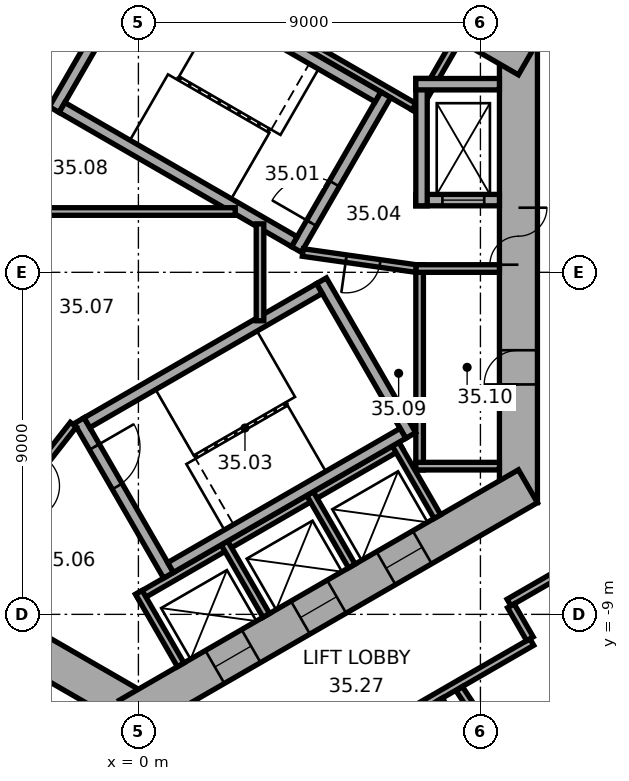
"""IFC4 building model, lengths in metres.
Left out: names, types, materials, properties, quantities, classifications, styles, units other than length and angle.
Written with IfcOpenShell. Run it as: python <this file> out.ifc"""

import sys

from ifc_helpers import new_model, si_unit, direction, frame, frame_2d, origin, place, context, subcontext, project, spatial, rectangle, extrude, element, fill, save


model = new_model("IFC4")
c1 = context("Model", 3, precision=1e-05, world=origin(), true_north=direction((0.0, 1.0)))
c2 = subcontext(c1, "Body", "Model", "MODEL_VIEW")
j1 = project(units=[si_unit("LENGTHUNIT", "METRE"), si_unit("PLANEANGLEUNIT", "RADIAN")], contexts=[c1])
p1 = place(None, origin())
s1 = spatial("IfcSite", under=j1, at=p1, CompositionType="ELEMENT")
p2 = place(p1, origin())
s2 = spatial("IfcBuilding", under=s1, at=p2, CompositionType="ELEMENT")
p3 = place(p2, frame((0.0, 0.0, 146.6)))
s3 = spatial("IfcBuildingStorey", under=s2, at=p3, CompositionType="ELEMENT", Elevation=146.6)
p4 = place(p3, frame((10.0, -6.062, 0.0), z_axis=(0.0, 0.0, 1.0), x_axis=(0.0, 1.0, 0.0)))
e1 = element("IfcWall", 1, at=p4, inside=s3, PredefinedType="SHEAR", context=c2, shape_type="SweptSolid", body=[
    extrude(rectangle(XDim=12.125, YDim=1.0, at=frame_2d((6.062, 0.0))), origin(), (0.0, 0.0, 1.0), 3.7),
])
p5 = place(p4, frame((6.262, 0.0, 0.0)))
e2 = element("IfcOpeningElement", 2, at=p5, cuts=e1, PredefinedType="OPENING", context=c2, shape_type="SweptSolid", body=[
    extrude(rectangle(XDim=1.5, YDim=2.1, at=frame_2d((0.75, 1.05))), frame((0.0, 0.51, 0.0), z_axis=(0.0, -1.0, 0.0), x_axis=(1.0, 0.0, 0.0)), (0.0, 0.0, 1.0), 1.02),
])
p6 = place(p4, frame((3.112, 0.0, 0.0)))
e3 = element("IfcOpeningElement", 3, at=p6, cuts=e1, PredefinedType="OPENING", context=c2, shape_type="SweptSolid", body=[
    extrude(rectangle(XDim=0.9, YDim=2.1, at=frame_2d((0.45, 1.05))), frame((0.0, 0.51, 0.0), z_axis=(0.0, -1.0, 0.0), x_axis=(1.0, 0.0, 0.0)), (0.0, 0.0, 1.0), 1.02),
])
p7 = place(p3, frame((10.25, 5.629, 0.0), z_axis=(0.0, 0.0, 1.0), x_axis=(-0.866022616891, 0.50000482701, 0.0)))
e4 = element("IfcWall", 4, at=p7, inside=s3, PredefinedType="SHEAR", context=c2, shape_type="SweptSolid", body=[
    extrude(rectangle(XDim=12.125, YDim=1.0, at=frame_2d((6.062, 0.0))), origin(), (0.0, 0.0, 1.0), 3.7),
])
p8 = place(p7, frame((4.012, 0.0, 0.0)))
e5 = element("IfcOpeningElement", 5, at=p8, cuts=e4, PredefinedType="OPENING", context=c2, shape_type="SweptSolid", body=[
    extrude(rectangle(XDim=0.9, YDim=2.1, at=frame_2d((0.45, 1.05))), frame((0.0, 0.51, 0.0), z_axis=(0.0, -1.0, 0.0), x_axis=(1.0, 0.0, 0.0)), (0.0, 0.0, 1.0), 1.02),
])
p9 = place(p7, frame((7.912, 0.0, 0.0)))
e6 = element("IfcOpeningElement", 6, at=p9, cuts=e4, PredefinedType="OPENING", context=c2, shape_type="SweptSolid", body=[
    extrude(rectangle(XDim=0.9, YDim=2.1, at=frame_2d((0.45, 1.05))), frame((0.0, 0.51, 0.0), z_axis=(0.0, -1.0, 0.0), x_axis=(1.0, 0.0, 0.0)), (0.0, 0.0, 1.0), 1.02),
])
p10 = place(p3, frame((0.25, 11.691, 0.0), z_axis=(0.0, 0.0, 1.0), x_axis=(-0.866022616891, -0.50000482701, 0.0)))
e7 = element("IfcWall", 7, at=p10, inside=s3, PredefinedType="SHEAR", context=c2, shape_type="SweptSolid", body=[
    extrude(rectangle(XDim=12.125, YDim=1.0, at=frame_2d((6.062, 0.0))), origin(), (0.0, 0.0, 1.0), 3.7),
])
p11 = place(p10, frame((6.262, 0.0, 0.0)))
e8 = element("IfcOpeningElement", 8, at=p11, cuts=e7, PredefinedType="OPENING", context=c2, shape_type="SweptSolid", body=[
    extrude(rectangle(XDim=1.5, YDim=2.1, at=frame_2d((0.75, 1.05))), frame((0.0, 0.51, 0.0), z_axis=(0.0, -1.0, 0.0), x_axis=(1.0, 0.0, 0.0)), (0.0, 0.0, 1.0), 1.02),
])
p12 = place(p10, frame((1.812, 0.0, 0.0)))
e9 = element("IfcOpeningElement", 9, at=p12, cuts=e7, PredefinedType="OPENING", context=c2, shape_type="SweptSolid", body=[
    extrude(rectangle(XDim=0.9, YDim=2.1, at=frame_2d((0.45, 1.05))), frame((0.0, 0.51, 0.0), z_axis=(0.0, -1.0, 0.0), x_axis=(1.0, 0.0, 0.0)), (0.0, 0.0, 1.0), 1.02),
])
p13 = place(p10, frame((4.412, 0.0, 0.0)))
e10 = element("IfcOpeningElement", 10, at=p13, cuts=e7, PredefinedType="OPENING", context=c2, shape_type="SweptSolid", body=[
    extrude(rectangle(XDim=0.9, YDim=2.1, at=frame_2d((0.45, 1.05))), frame((0.0, 0.51, 0.0), z_axis=(0.0, -1.0, 0.0), x_axis=(1.0, 0.0, 0.0)), (0.0, 0.0, 1.0), 1.02),
])
p14 = place(p3, frame((-10.25, -5.629, 0.0), z_axis=(0.0, 0.0, 1.0), x_axis=(0.866022616891, -0.50000482701, 0.0)))
e11 = element("IfcWall", 11, at=p14, inside=s3, PredefinedType="SHEAR", context=c2, shape_type="SweptSolid", body=[
    extrude(rectangle(XDim=12.125, YDim=1.0, at=frame_2d((6.062, 0.0))), origin(), (0.0, 0.0, 1.0), 3.7),
])
p15 = place(p14, frame((6.262, 0.0, 0.0)))
e12 = element("IfcOpeningElement", 12, at=p15, cuts=e11, PredefinedType="OPENING", context=c2, shape_type="SweptSolid", body=[
    extrude(rectangle(XDim=1.5, YDim=2.1, at=frame_2d((0.75, 1.05))), frame((0.0, 0.51, 0.0), z_axis=(0.0, -1.0, 0.0), x_axis=(1.0, 0.0, 0.0)), (0.0, 0.0, 1.0), 1.02),
])
p16 = place(p14, frame((1.712, 0.0, 0.0)))
e13 = element("IfcOpeningElement", 13, at=p16, cuts=e11, PredefinedType="OPENING", context=c2, shape_type="SweptSolid", body=[
    extrude(rectangle(XDim=1.1, YDim=2.1, at=frame_2d((0.55, 1.05))), frame((0.0, 0.51, 0.0), z_axis=(0.0, -1.0, 0.0), x_axis=(1.0, 0.0, 0.0)), (0.0, 0.0, 1.0), 1.02),
])
p17 = place(p14, frame((4.312, 0.0, 0.0)))
e14 = element("IfcOpeningElement", 14, at=p17, cuts=e11, PredefinedType="OPENING", context=c2, shape_type="SweptSolid", body=[
    extrude(rectangle(XDim=1.1, YDim=2.1, at=frame_2d((0.55, 1.05))), frame((0.0, 0.51, 0.0), z_axis=(0.0, -1.0, 0.0), x_axis=(1.0, 0.0, 0.0)), (0.0, 0.0, 1.0), 1.02),
])
p18 = place(p3, frame((-0.25, -11.691, 0.0), z_axis=(0.0, 0.0, 1.0), x_axis=(0.866022616891, 0.50000482701, 0.0)))
e15 = element("IfcWall", 15, at=p18, inside=s3, PredefinedType="SHEAR", context=c2, shape_type="SweptSolid", body=[
    extrude(rectangle(XDim=12.125, YDim=1.0, at=frame_2d((6.062, 0.0))), origin(), (0.0, 0.0, 1.0), 3.7),
])
p19 = place(p18, frame((2.612, 0.0, 0.0)))
e16 = element("IfcOpeningElement", 16, at=p19, cuts=e15, PredefinedType="OPENING", context=c2, shape_type="SweptSolid", body=[
    extrude(rectangle(XDim=1.1, YDim=2.1, at=frame_2d((0.55, 1.05))), frame((0.0, 0.51, 0.0), z_axis=(0.0, -1.0, 0.0), x_axis=(1.0, 0.0, 0.0)), (0.0, 0.0, 1.0), 1.02),
])
p20 = place(p18, frame((5.212, 0.0, 0.0)))
e17 = element("IfcOpeningElement", 17, at=p20, cuts=e15, PredefinedType="OPENING", context=c2, shape_type="SweptSolid", body=[
    extrude(rectangle(XDim=1.1, YDim=2.1, at=frame_2d((0.55, 1.05))), frame((0.0, 0.51, 0.0), z_axis=(0.0, -1.0, 0.0), x_axis=(1.0, 0.0, 0.0)), (0.0, 0.0, 1.0), 1.02),
])
p21 = place(p18, frame((7.812, 0.0, 0.0)))
e18 = element("IfcOpeningElement", 18, at=p21, cuts=e15, PredefinedType="OPENING", context=c2, shape_type="SweptSolid", body=[
    extrude(rectangle(XDim=1.1, YDim=2.1, at=frame_2d((0.55, 1.05))), frame((0.0, 0.51, 0.0), z_axis=(0.0, -1.0, 0.0), x_axis=(1.0, 0.0, 0.0)), (0.0, 0.0, 1.0), 1.02),
])
p22 = place(p3, frame((7.4, -5.2, 0.0), z_axis=(0.0, 0.0, 1.0), x_axis=(0.0, 1.0, 0.0)))
e19 = element("IfcWall", 19, at=p22, inside=s3, PredefinedType="PARTITIONING", context=c2, shape_type="SweptSolid", body=[
    extrude(rectangle(XDim=5.4, YDim=0.2, at=frame_2d((2.7, 0.0))), origin(), (0.0, 0.0, 1.0), 3.42),
])
for number, where, z_axis, x_axis in (
    (20, (7.3, -5.1, 0.0), (0.0, 0.0, 1.0), (1.0, 0.0, 0.0)),
    (21, (7.3, 0.1, 0.0), (0.0, 0.0, 1.0), (1.0, 0.0, 0.0)),
):
    element("IfcWall", number, at=place(p3, frame(where, z_axis=z_axis, x_axis=x_axis)), inside=s3, PredefinedType="PARTITIONING", context=c2, shape_type="SweptSolid", body=[
        extrude(rectangle(XDim=2.2, YDim=0.2, at=frame_2d((1.1, 0.0))), origin(), (0.0, 0.0, 1.0), 3.42),
    ])
p23 = place(p3, frame((7.424, 4.259, 0.0), z_axis=(0.0, 0.0, 1.0), x_axis=(-0.866026010844, 0.49999894854, 0.0)))
e22 = element("IfcWall", 22, at=p23, inside=s3, PredefinedType="PARTITIONING", context=c2, shape_type="SweptSolid", body=[
    extrude(rectangle(XDim=8.0, YDim=0.2, at=frame_2d((4.0, 0.0))), origin(), (0.0, 0.0, 1.0), 3.42),
])
p24 = place(p3, frame((7.287, 4.222, 0.0), z_axis=(0.0, 0.0, 1.0), x_axis=(0.499946605688, 0.86605622881, 0.0)))
e23 = element("IfcWall", 23, at=p24, inside=s3, PredefinedType="PARTITIONING", context=c2, shape_type="SweptSolid", body=[
    extrude(rectangle(XDim=2.2, YDim=0.2, at=frame_2d((1.1, 0.0))), origin(), (0.0, 0.0, 1.0), 3.42),
])
p25 = place(p3, frame((-0.024, -8.559, 0.0), z_axis=(0.0, 0.0, 1.0), x_axis=(0.866026010844, 0.49999894854, 0.0)))
e24 = element("IfcWall", 24, at=p25, inside=s3, PredefinedType="PARTITIONING", context=c2, shape_type="SweptSolid", body=[
    extrude(rectangle(XDim=8.0, YDim=0.2, at=frame_2d((4.0, 0.0))), origin(), (0.0, 0.0, 1.0), 3.42),
])
for number, where, z_axis, x_axis in (
    (25, (0.013, -8.422, 0.0), (0.0, 0.0, 1.0), (0.5, -0.866, 0.0)),
    (26, (2.264, -7.122, 0.0), (0.0, 0.0, 1.0), (0.5, -0.866, 0.0)),
    (27, (4.516, -5.822, 0.0), (0.0, 0.0, 1.0), (0.5, -0.866, 0.0)),
    (28, (6.768, -4.522, 0.0), (0.0, 0.0, 1.0), (0.5, -0.866, 0.0)),
):
    element("IfcWall", number, at=place(p3, frame(where, z_axis=z_axis, x_axis=x_axis)), inside=s3, PredefinedType="PARTITIONING", context=c2, shape_type="SweptSolid", body=[
        extrude(rectangle(XDim=2.2, YDim=0.2, at=frame_2d((1.1, 0.0))), origin(), (0.0, 0.0, 1.0), 3.42),
    ])
p26 = place(p3, frame((4.158, 0.602, 0.0), z_axis=(0.0, 0.0, 1.0), x_axis=(0.499977259774, 0.866038532462, 0.0)))
e29 = element("IfcWall", 29, at=p26, inside=s3, PredefinedType="SHEAR", context=c2, shape_type="SweptSolid", body=[
    extrude(rectangle(XDim=4.7, YDim=0.3, at=frame_2d((2.35, 0.0))), origin(), (0.0, 0.0, 1.0), 3.42),
])
p27 = place(p26, frame((0.8, 0.0, 0.0)))
e30 = element("IfcOpeningElement", 30, at=p27, cuts=e29, PredefinedType="OPENING", context=c2, shape_type="SweptSolid", body=[
    extrude(rectangle(XDim=1.2, YDim=2.1, at=frame_2d((0.6, 1.05))), frame((0.0, 0.16, 0.0), z_axis=(0.0, -1.0, 0.0), x_axis=(1.0, 0.0, 0.0)), (0.0, 0.0, 1.0), 0.32),
])
p28 = place(p3, frame((-2.216, 4.282, 0.0), z_axis=(0.0, 0.0, 1.0), x_axis=(0.499977259774, 0.866038532462, 0.0)))
e31 = element("IfcWall", 31, at=p28, inside=s3, PredefinedType="SHEAR", context=c2, shape_type="SweptSolid", body=[
    extrude(rectangle(XDim=4.7, YDim=0.3, at=frame_2d((2.35, 0.0))), origin(), (0.0, 0.0, 1.0), 3.42),
])
for number, where, z_axis, x_axis in (
    (32, (4.103, 0.807, 0.0), (0.0, 0.0, 1.0), (-0.866, 0.5, 0.0)),
    (33, (6.303, 4.617, 0.0), (0.0, 0.0, 1.0), (-0.866, 0.5, 0.0)),
):
    element("IfcWall", number, at=place(p3, frame(where, z_axis=z_axis, x_axis=x_axis)), inside=s3, PredefinedType="SHEAR", context=c2, shape_type="SweptSolid", body=[
        extrude(rectangle(XDim=7.06, YDim=0.3, at=frame_2d((3.53, 0.0))), origin(), (0.0, 0.0, 1.0), 3.42),
    ])
p29 = place(p3, frame((-1.558, -3.902, 0.0), z_axis=(0.0, 0.0, 1.0), x_axis=(0.499977259774, -0.866038532462, 0.0)))
e34 = element("IfcWall", 34, at=p29, inside=s3, PredefinedType="SHEAR", context=c2, shape_type="SweptSolid", body=[
    extrude(rectangle(XDim=4.7, YDim=0.3, at=frame_2d((2.35, 0.0))), origin(), (0.0, 0.0, 1.0), 3.42),
])
p30 = place(p29, frame((0.8, 0.0, 0.0)))
e35 = element("IfcOpeningElement", 35, at=p30, cuts=e34, PredefinedType="OPENING", context=c2, shape_type="SweptSolid", body=[
    extrude(rectangle(XDim=1.2, YDim=2.1, at=frame_2d((0.6, 1.05))), frame((0.0, 0.16, 0.0), z_axis=(0.0, -1.0, 0.0), x_axis=(1.0, 0.0, 0.0)), (0.0, 0.0, 1.0), 0.32),
])
p31 = place(p3, frame((4.816, -0.222, 0.0), z_axis=(0.0, 0.0, 1.0), x_axis=(0.499977259774, -0.866038532462, 0.0)))
e36 = element("IfcWall", 36, at=p31, inside=s3, PredefinedType="SHEAR", context=c2, shape_type="SweptSolid", body=[
    extrude(rectangle(XDim=4.7, YDim=0.3, at=frame_2d((2.35, 0.0))), origin(), (0.0, 0.0, 1.0), 3.42),
])
for number, where, z_axis, x_axis in (
    (37, (-1.353, -3.957, 0.0), (0.0, 0.0, 1.0), (0.866, 0.5, 0.0)),
    (38, (0.847, -7.767, 0.0), (0.0, 0.0, 1.0), (0.866, 0.5, 0.0)),
):
    element("IfcWall", number, at=place(p3, frame(where, z_axis=z_axis, x_axis=x_axis)), inside=s3, PredefinedType="SHEAR", context=c2, shape_type="SweptSolid", body=[
        extrude(rectangle(XDim=7.06, YDim=0.3, at=frame_2d((3.53, 0.0))), origin(), (0.0, 0.0, 1.0), 3.42),
    ])
p32 = place(p3, frame((7.3, 1.9, 0.0), z_axis=(0.0, 0.0, 1.0), x_axis=(1.0, 0.0, 0.0)))
e39 = element("IfcWall", 39, at=p32, inside=s3, PredefinedType="SHEAR", context=c2, shape_type="SweptSolid", body=[
    extrude(rectangle(XDim=2.2, YDim=0.3, at=frame_2d((1.1, 0.0))), origin(), (0.0, 0.0, 1.0), 3.42),
])
p33 = place(p32, frame((0.7, 0.0, 0.0)))
e40 = element("IfcOpeningElement", 40, at=p33, cuts=e39, PredefinedType="OPENING", context=c2, shape_type="SweptSolid", body=[
    extrude(rectangle(XDim=1.1, YDim=2.1, at=frame_2d((0.55, 1.05))), frame((0.0, 0.16, 0.0), z_axis=(0.0, -1.0, 0.0), x_axis=(1.0, 0.0, 0.0)), (0.0, 0.0, 1.0), 0.32),
])
p34 = place(p3, frame((7.45, 1.75, 0.0), z_axis=(0.0, 0.0, 1.0), x_axis=(0.0, 1.0, 0.0)))
e41 = element("IfcWall", 41, at=p34, inside=s3, PredefinedType="SHEAR", context=c2, shape_type="SweptSolid", body=[
    extrude(rectangle(XDim=3.35, YDim=0.3, at=frame_2d((1.675, 0.0))), origin(), (0.0, 0.0, 1.0), 3.42),
])
p35 = place(p3, frame((7.3, 4.95, 0.0), z_axis=(0.0, 0.0, 1.0), x_axis=(1.0, 0.0, 0.0)))
e42 = element("IfcWall", 42, at=p35, inside=s3, PredefinedType="SHEAR", context=c2, shape_type="SweptSolid", body=[
    extrude(rectangle(XDim=2.2, YDim=0.3, at=frame_2d((1.1, 0.0))), origin(), (0.0, 0.0, 1.0), 3.42),
])
p36 = place(p3, frame((4.327, 0.521, 0.0), z_axis=(0.0, 0.0, 1.0), x_axis=(0.990124376366, -0.14019172346, 0.0)))
e43 = element("IfcWall", 43, at=p36, inside=s3, PredefinedType="PARTITIONING", context=c2, shape_type="SweptSolid", body=[
    extrude(rectangle(XDim=3.002, YDim=0.2, at=frame_2d((1.501, 0.0))), origin(), (0.0, 0.0, 1.0), 3.42),
])
p37 = place(p36, frame((1.15, 0.0, 0.0)))
e44 = element("IfcOpeningElement", 44, at=p37, cuts=e43, PredefinedType="OPENING", context=c2, shape_type="SweptSolid", body=[
    extrude(rectangle(XDim=0.9, YDim=2.1, at=frame_2d((0.45, 1.05))), frame((0.0, 0.11, 0.0), z_axis=(0.0, -1.0, 0.0), x_axis=(1.0, 0.0, 0.0)), (0.0, 0.0, 1.0), 0.22),
])
p38 = place(p3, frame((-1.712, -4.008, 0.0), z_axis=(0.0, 0.0, 1.0), x_axis=(-0.616549420702, -0.787316208287, 0.0)))
e45 = element("IfcWall", 45, at=p38, inside=s3, PredefinedType="PARTITIONING", context=c2, shape_type="SweptSolid", body=[
    extrude(rectangle(XDim=3.002, YDim=0.2, at=frame_2d((1.501, 0.0))), origin(), (0.0, 0.0, 1.0), 3.42),
])
p39 = place(p38, frame((1.15, 0.0, 0.0)))
e46 = element("IfcOpeningElement", 46, at=p39, cuts=e45, PredefinedType="OPENING", context=c2, shape_type="SweptSolid", body=[
    extrude(rectangle(XDim=0.9, YDim=2.1, at=frame_2d((0.45, 1.05))), frame((0.0, 0.11, 0.0), z_axis=(0.0, -1.0, 0.0), x_axis=(1.0, 0.0, 0.0)), (0.0, 0.0, 1.0), 0.22),
])
p40 = place(p3, frame((-2.72, 1.6, 0.0), z_axis=(0.0, 0.0, 1.0), x_axis=(1.0, 0.0, 0.0)))
e47 = element("IfcWall", 47, at=p40, inside=s3, PredefinedType="PARTITIONING", context=c2, shape_type="SweptSolid", body=[
    extrude(rectangle(XDim=5.269, YDim=0.2, at=frame_2d((2.634, 0.0))), origin(), (0.0, 0.0, 1.0), 3.42),
])
p41 = place(p3, frame((3.2, -1.275, 0.0), z_axis=(0.0, 0.0, 1.0), x_axis=(0.0, 1.0, 0.0)))
e48 = element("IfcWall", 48, at=p41, inside=s3, PredefinedType="PARTITIONING", context=c2, shape_type="SweptSolid", body=[
    extrude(rectangle(XDim=2.549, YDim=0.2, at=frame_2d((1.275, 0.0))), origin(), (0.0, 0.0, 1.0), 3.42),
])
p42 = place(p3, frame((4.955, -12.844, 0.0), z_axis=(0.0, 0.0, 1.0), x_axis=(0.86602379309, 0.500002789795, 0.0)))
e49 = element("IfcWall", 49, at=p42, inside=s3, PredefinedType="PARTITIONING", context=c2, shape_type="SweptSolid", body=[
    extrude(rectangle(XDim=6.232, YDim=0.2, at=frame_2d((3.116, 0.0))), origin(), (0.0, 0.0, 1.0), 3.42),
])
p43 = place(p3, frame((7.949, -11.231, 0.0), z_axis=(0.0, 0.0, 1.0), x_axis=(0.500010275428, -0.866019471182, 0.0)))
e50 = element("IfcWall", 50, at=p43, inside=s3, PredefinedType="PARTITIONING", context=c2, shape_type="SweptSolid", body=[
    extrude(rectangle(XDim=3.5, YDim=0.12, at=frame_2d((1.75, 0.0))), origin(), (0.0, 0.0, 1.0), 3.42),
])
p44 = place(p3, frame((9.752, -8.688, 0.0), z_axis=(0.0, 0.0, 1.0), x_axis=(0.865974105138, 0.500088841337, 0.0)))
e51 = element("IfcWall", 51, at=p44, inside=s3, PredefinedType="PARTITIONING", context=c2, shape_type="SweptSolid", body=[
    extrude(rectangle(XDim=1.961, YDim=0.2, at=frame_2d((0.98, 0.0))), origin(), (0.0, 0.0, 1.0), 3.42),
])
p45 = place(p3, frame((10.302, -9.642, 0.0), z_axis=(0.0, 0.0, 1.0), x_axis=(-0.500074377092, 0.865982457891, 0.0)))
e52 = element("IfcWall", 52, at=p45, inside=s3, PredefinedType="PARTITIONING", context=c2, shape_type="SweptSolid", body=[
    extrude(rectangle(XDim=1.001, YDim=0.2, at=frame_2d((0.5, 0.0))), origin(), (0.0, 0.0, 1.0), 3.42),
])
p46 = place(p3, frame((12.281, -16.755, 0.0), z_axis=(0.0, 0.0, 1.0), x_axis=(-0.551925794663, 0.833893228888, 0.0)))
e53 = element("IfcWall", 53, at=p46, inside=s3, PredefinedType="PARTITIONING", context=c2, shape_type="SweptSolid", body=[
    extrude(rectangle(XDim=6.953, YDim=0.2, at=frame_2d((3.476, 0.0))), origin(), (0.0, 0.0, 1.0), 3.42),
])
p47 = place(p5, origin())
e54 = element("IfcDoor", 54, at=p47, inside=s3, OperationType="DOUBLE_DOOR_SINGLE_SWING", PredefinedType="DOOR", context=c2, shape_type="SweptSolid", body=[
    extrude(rectangle(XDim=1.5, YDim=2.1, at=frame_2d((0.75, 1.05))), frame((0.0, 0.025, 0.0), z_axis=(0.0, -1.0, 0.0), x_axis=(1.0, 0.0, 0.0)), (0.0, 0.0, 1.0), 0.05),
])
fill(e2, e54)
p48 = place(p27, origin())
e55 = element("IfcDoor", 55, at=p48, inside=s3, OperationType="SINGLE_SWING_RIGHT", PredefinedType="DOOR", context=c2, shape_type="SweptSolid", body=[
    extrude(rectangle(XDim=1.2, YDim=2.1, at=frame_2d((0.6, 1.05))), frame((0.0, 0.025, 0.0), z_axis=(0.0, -1.0, 0.0), x_axis=(1.0, 0.0, 0.0)), (0.0, 0.0, 1.0), 0.05),
])
fill(e30, e55)
p49 = place(p30, origin())
e56 = element("IfcDoor", 56, at=p49, inside=s3, OperationType="SINGLE_SWING_RIGHT", PredefinedType="DOOR", context=c2, shape_type="SweptSolid", body=[
    extrude(rectangle(XDim=1.2, YDim=2.1, at=frame_2d((0.6, 1.05))), frame((0.0, 0.025, 0.0), z_axis=(0.0, -1.0, 0.0), x_axis=(1.0, 0.0, 0.0)), (0.0, 0.0, 1.0), 0.05),
])
fill(e35, e56)
p50 = place(p37, origin())
e57 = element("IfcDoor", 57, at=p50, inside=s3, OperationType="SINGLE_SWING_LEFT", PredefinedType="DOOR", context=c2, shape_type="SweptSolid", body=[
    extrude(rectangle(XDim=0.9, YDim=2.1, at=frame_2d((0.45, 1.05))), frame((0.0, 0.025, 0.0), z_axis=(0.0, -1.0, 0.0), x_axis=(1.0, 0.0, 0.0)), (0.0, 0.0, 1.0), 0.05),
])
fill(e44, e57)
p51 = place(p6, origin())
e58 = element("IfcDoor", 58, at=p51, inside=s3, OperationType="SINGLE_SWING_LEFT", PredefinedType="DOOR", context=c2, shape_type="SweptSolid", body=[
    extrude(rectangle(XDim=0.9, YDim=2.1, at=frame_2d((0.45, 1.05))), frame((0.0, 0.025, 0.0), z_axis=(0.0, -1.0, 0.0), x_axis=(1.0, 0.0, 0.0)), (0.0, 0.0, 1.0), 0.05),
])
fill(e3, e58)
p52 = place(p33, origin())
e59 = element("IfcDoor", 59, at=p52, inside=s3, OperationType="DOUBLE_DOOR_SLIDING", PredefinedType="DOOR", context=c2, shape_type="SweptSolid", body=[
    extrude(rectangle(XDim=1.1, YDim=2.1, at=frame_2d((0.55, 1.05))), frame((0.0, 0.025, 0.0), z_axis=(0.0, -1.0, 0.0), x_axis=(1.0, 0.0, 0.0)), (0.0, 0.0, 1.0), 0.05),
])
fill(e40, e59)
p53 = place(p19, origin())
e60 = element("IfcDoor", 60, at=p53, inside=s3, OperationType="DOUBLE_DOOR_SLIDING", PredefinedType="DOOR", context=c2, shape_type="SweptSolid", body=[
    extrude(rectangle(XDim=1.1, YDim=2.1, at=frame_2d((0.55, 1.05))), frame((0.0, 0.025, 0.0), z_axis=(0.0, -1.0, 0.0), x_axis=(1.0, 0.0, 0.0)), (0.0, 0.0, 1.0), 0.05),
])
fill(e16, e60)
p54 = place(p20, origin())
e61 = element("IfcDoor", 61, at=p54, inside=s3, OperationType="DOUBLE_DOOR_SLIDING", PredefinedType="DOOR", context=c2, shape_type="SweptSolid", body=[
    extrude(rectangle(XDim=1.1, YDim=2.1, at=frame_2d((0.55, 1.05))), frame((0.0, 0.025, 0.0), z_axis=(0.0, -1.0, 0.0), x_axis=(1.0, 0.0, 0.0)), (0.0, 0.0, 1.0), 0.05),
])
fill(e17, e61)
p55 = place(p21, origin())
e62 = element("IfcDoor", 62, at=p55, inside=s3, OperationType="DOUBLE_DOOR_SLIDING", PredefinedType="DOOR", context=c2, shape_type="SweptSolid", body=[
    extrude(rectangle(XDim=1.1, YDim=2.1, at=frame_2d((0.55, 1.05))), frame((0.0, 0.025, 0.0), z_axis=(0.0, -1.0, 0.0), x_axis=(1.0, 0.0, 0.0)), (0.0, 0.0, 1.0), 0.05),
])
fill(e18, e62)
save(model, sys.argv[1])
